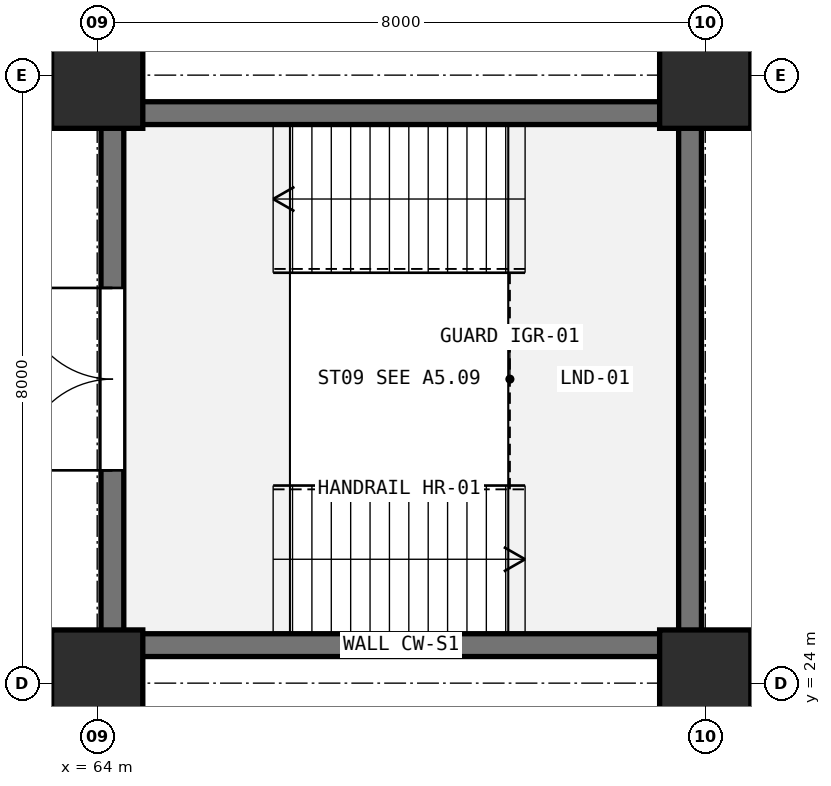
"""IFC4 building model, lengths in metres.
Left out: names, types, materials, properties, quantities, classifications, styles, units other than length and angle.
Written with IfcOpenShell. Run it as: python <this file> out.ifc"""

import sys

from ifc_helpers import new_model, si_unit, direction, frame, frame_2d, origin, origin_2d, place, context, subcontext, project, spatial, rectangle, extrude, element, fill, save


model = new_model("IFC4")
c1 = context("Model", 3, precision=1e-05, world=origin(), true_north=direction((0.0, 1.0)))
c2 = subcontext(c1, "Body", "Model", "MODEL_VIEW")
j1 = project(units=[si_unit("LENGTHUNIT", "METRE"), si_unit("PLANEANGLEUNIT", "RADIAN")], contexts=[c1])
p1 = place(None, origin())
s1 = spatial("IfcSite", under=j1, at=p1, CompositionType="ELEMENT")
p2 = place(p1, origin())
s2 = spatial("IfcBuilding", under=s1, at=p2, CompositionType="ELEMENT")
p3 = place(p2, frame((0.0, 0.0, -4.8)))
s3 = spatial("IfcBuildingStorey", under=s2, at=p3, CompositionType="ELEMENT", Elevation=-4.8)
for number, where, z_axis, x_axis in (
    (1, (64.0, 24.0, 0.0), (0.0, 0.0, 1.0), (1.0, 0.0, 0.0)),
    (2, (64.0, 32.0, 0.0), (0.0, 0.0, 1.0), (1.0, 0.0, 0.0)),
    (3, (72.0, 24.0, 0.0), (0.0, 0.0, 1.0), (1.0, 0.0, 0.0)),
    (4, (72.0, 32.0, 0.0), (0.0, 0.0, 1.0), (1.0, 0.0, 0.0)),
):
    element("IfcColumn", number, at=place(p3, frame(where, z_axis=z_axis, x_axis=x_axis)), inside=s3, PredefinedType="COLUMN", context=c2, shape_type="SweptSolid", body=[
        extrude(rectangle(XDim=1.2, YDim=1.4, at=origin_2d()), origin(), (0.0, 0.0, 1.0), 4.8),
    ])
p4 = place(p3, frame((71.8, 24.5, 0.0), z_axis=(0.0, 0.0, 1.0), x_axis=(-1.0, 0.0, 0.0)))
e5 = element("IfcWall", 5, at=p4, inside=s3, PredefinedType="SHEAR", context=c2, shape_type="SweptSolid", body=[
    extrude(rectangle(XDim=7.6, YDim=0.3, at=frame_2d((3.8, 0.0))), origin(), (0.0, 0.0, 1.0), 4.46),
])
p5 = place(p3, frame((64.2, 24.5, 0.0), z_axis=(0.0, 0.0, 1.0), x_axis=(0.0, 1.0, 0.0)))
e6 = element("IfcWall", 6, at=p5, inside=s3, PredefinedType="SHEAR", context=c2, shape_type="SweptSolid", body=[
    extrude(rectangle(XDim=7.0, YDim=0.3, at=frame_2d((3.5, 0.0))), origin(), (0.0, 0.0, 1.0), 4.46),
])
p6 = place(p5, frame((2.3, 0.0, 0.0)))
e7 = element("IfcOpeningElement", 7, at=p6, cuts=e6, PredefinedType="OPENING", context=c2, shape_type="SweptSolid", body=[
    extrude(rectangle(XDim=2.4, YDim=2.2, at=frame_2d((1.2, 1.1))), frame((0.0, 0.16, 0.0), z_axis=(0.0, -1.0, 0.0), x_axis=(1.0, 0.0, 0.0)), (0.0, 0.0, 1.0), 0.32),
])
p7 = place(p3, frame((64.2, 31.5, 0.0), z_axis=(0.0, 0.0, 1.0), x_axis=(1.0, 0.0, 0.0)))
e8 = element("IfcWall", 8, at=p7, inside=s3, PredefinedType="SHEAR", context=c2, shape_type="SweptSolid", body=[
    extrude(rectangle(XDim=7.6, YDim=0.3, at=frame_2d((3.8, 0.0))), origin(), (0.0, 0.0, 1.0), 4.46),
])
p8 = place(p3, frame((71.8, 31.5, 0.0), z_axis=(0.0, 0.0, 1.0), x_axis=(0.0, -1.0, 0.0)))
e9 = element("IfcWall", 9, at=p8, inside=s3, PredefinedType="SHEAR", context=c2, shape_type="SweptSolid", body=[
    extrude(rectangle(XDim=7.0, YDim=0.3, at=frame_2d((3.5, 0.0))), origin(), (0.0, 0.0, 1.0), 4.46),
])
p9 = place(p6, frame((2.4, 0.0, 0.0), z_axis=(0.0, 0.0, 1.0), x_axis=(-1.0, 0.0, 0.0)))
e10 = element("IfcDoor", 10, at=p9, inside=s3, OperationType="DOUBLE_DOOR_SINGLE_SWING", PredefinedType="DOOR", context=c2, shape_type="SweptSolid", body=[
    extrude(rectangle(XDim=2.4, YDim=2.2, at=frame_2d((1.2, 1.1))), frame((0.0, 0.025, 0.0), z_axis=(0.0, -1.0, 0.0), x_axis=(1.0, 0.0, 0.0)), (0.0, 0.0, 1.0), 0.05),
])
fill(e7, e10)
save(model, sys.argv[1])
